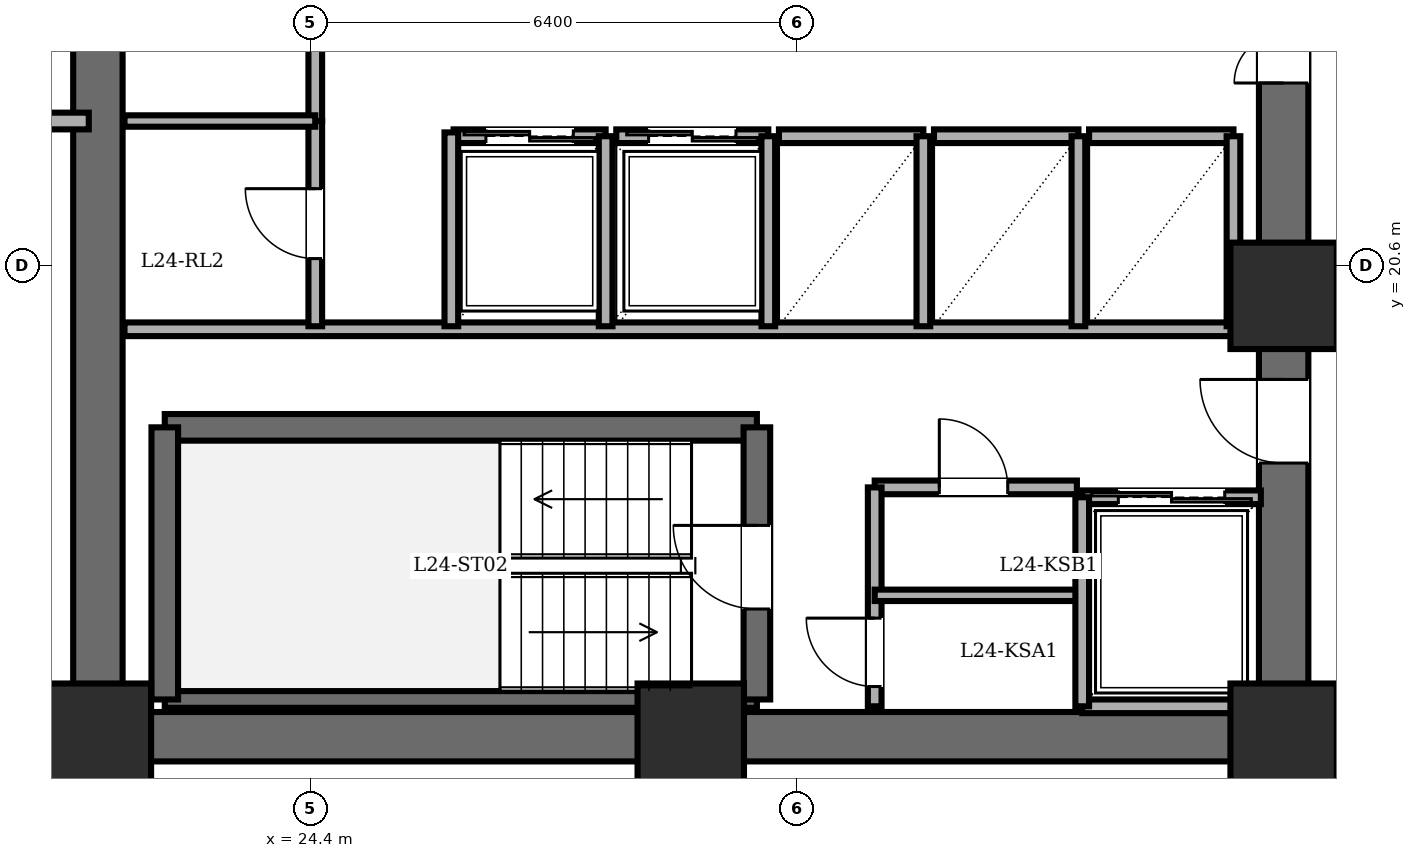
"""IFC4 building model, lengths in metres.
Left out: names, types, materials, properties, quantities, classifications, styles, units other than length and angle.
Written with IfcOpenShell. Run it as: python <this file> out.ifc"""

import sys

from ifc_helpers import new_model, si_unit, direction, frame, frame_2d, origin, origin_2d, place, context, subcontext, project, spatial, rectangle, extrude, element, fill, save


model = new_model("IFC4")
c1 = context("Model", 3, precision=1e-05, world=origin(), true_north=direction((0.0, 1.0)))
c2 = subcontext(c1, "Body", "Model", "MODEL_VIEW")
j1 = project(units=[si_unit("LENGTHUNIT", "METRE"), si_unit("PLANEANGLEUNIT", "RADIAN")], contexts=[c1])
p1 = place(None, origin())
s1 = spatial("IfcSite", under=j1, at=p1, CompositionType="ELEMENT")
p2 = place(p1, origin())
s2 = spatial("IfcBuilding", under=s1, at=p2, CompositionType="ELEMENT")
p3 = place(p2, frame((0.0, 0.0, 93.5)))
s3 = spatial("IfcBuildingStorey", under=s2, at=p3, CompositionType="ELEMENT", Elevation=93.5)
for number, where, z_axis, x_axis in (
    (1, (21.6, 14.4, 0.0), (0.0, 0.0, 1.0), (1.0, 0.0, 0.0)),
    (2, (29.4, 14.4, 0.0), (0.0, 0.0, 1.0), (1.0, 0.0, 0.0)),
    (3, (37.2, 14.4, 0.0), (0.0, 0.0, 1.0), (1.0, 0.0, 0.0)),
    (4, (37.2, 20.2, 0.0), (0.0, 0.0, 1.0), (1.0, 0.0, 0.0)),
):
    element("IfcColumn", number, at=place(p3, frame(where, z_axis=z_axis, x_axis=x_axis)), inside=s3, PredefinedType="COLUMN", context=c2, shape_type="SweptSolid", body=[
        extrude(rectangle(XDim=1.4, YDim=1.4, at=origin_2d()), origin(), (0.0, 0.0, 1.0), 3.6),
    ])
p4 = place(p3, frame((21.6, 14.4, 0.0), z_axis=(0.0, 0.0, 1.0), x_axis=(0.0, 1.0, 0.0)))
e5 = element("IfcWall", 5, at=p4, inside=s3, PredefinedType="SHEAR", context=c2, shape_type="SweptSolid", body=[
    extrude(rectangle(XDim=19.2, YDim=0.65, at=frame_2d((9.6, 0.0))), origin(), (0.0, 0.0, 1.0), 3.4),
])
p5 = place(p3, frame((37.2, 14.4, 0.0), z_axis=(0.0, 0.0, 1.0), x_axis=(-1.0, 0.0, 0.0)))
e6 = element("IfcWall", 6, at=p5, inside=s3, PredefinedType="SHEAR", context=c2, shape_type="SweptSolid", body=[
    extrude(rectangle(XDim=15.6, YDim=0.65, at=frame_2d((7.8, 0.0))), origin(), (0.0, 0.0, 1.0), 3.4),
])
p6 = place(p3, frame((37.2, 14.4, 0.0), z_axis=(0.0, 0.0, 1.0), x_axis=(0.0, 1.0, 0.0)))
e7 = element("IfcWall", 7, at=p6, inside=s3, PredefinedType="SHEAR", context=c2, shape_type="SweptSolid", body=[
    extrude(rectangle(XDim=19.2, YDim=0.65, at=frame_2d((9.6, 0.0))), origin(), (0.0, 0.0, 1.0), 3.4),
])
p7 = place(p6, frame((15.8, 0.0, 0.0)))
e8 = element("IfcOpeningElement", 8, at=p7, cuts=e7, PredefinedType="OPENING", context=c2, shape_type="SweptSolid", body=[
    extrude(rectangle(XDim=1.15, YDim=2.15, at=frame_2d((0.575, 1.075))), frame((0.0, 0.335, 0.0), z_axis=(0.0, -1.0, 0.0), x_axis=(1.0, 0.0, 0.0)), (0.0, 0.0, 1.0), 0.67),
])
p8 = place(p6, frame((3.6, 0.0, 0.0)))
e9 = element("IfcOpeningElement", 9, at=p8, cuts=e7, PredefinedType="OPENING", context=c2, shape_type="SweptSolid", body=[
    extrude(rectangle(XDim=1.1, YDim=2.15, at=frame_2d((0.55, 1.075))), frame((0.0, 0.335, 0.0), z_axis=(0.0, -1.0, 0.0), x_axis=(1.0, 0.0, 0.0)), (0.0, 0.0, 1.0), 0.67),
])
p9 = place(p6, frame((8.6, 0.0, 0.0)))
e10 = element("IfcOpeningElement", 10, at=p9, cuts=e7, PredefinedType="OPENING", context=c2, shape_type="SweptSolid", body=[
    extrude(rectangle(XDim=1.3, YDim=2.2, at=frame_2d((0.65, 1.1))), frame((0.0, 0.335, 0.0), z_axis=(0.0, -1.0, 0.0), x_axis=(1.0, 0.0, 0.0)), (0.0, 0.0, 1.0), 0.67),
])
p10 = place(p3, frame((22.48, 18.47, 0.0), z_axis=(0.0, 0.0, 1.0), x_axis=(1.0, 0.0, 0.0)))
e11 = element("IfcWall", 11, at=p10, inside=s3, PredefinedType="SOLIDWALL", context=c2, shape_type="SweptSolid", body=[
    extrude(rectangle(XDim=7.79, YDim=0.35, at=frame_2d((3.895, 0.0))), origin(), (0.0, 0.0, 1.0), 3.4),
])
p11 = place(p3, frame((22.48, 14.89, 0.0), z_axis=(0.0, 0.0, 1.0), x_axis=(1.0, 0.0, 0.0)))
e12 = element("IfcWall", 12, at=p11, inside=s3, PredefinedType="PARTITIONING", context=c2, shape_type="SweptSolid", body=[
    extrude(rectangle(XDim=7.79, YDim=0.22, at=frame_2d((3.895, 0.0))), origin(), (0.0, 0.0, 1.0), 3.4),
])
p12 = place(p3, frame((22.48, 14.89, 0.0), z_axis=(0.0, 0.0, 1.0), x_axis=(0.0, 1.0, 0.0)))
e13 = element("IfcWall", 13, at=p12, inside=s3, PredefinedType="SOLIDWALL", context=c2, shape_type="SweptSolid", body=[
    extrude(rectangle(XDim=3.58, YDim=0.35, at=frame_2d((1.79, 0.0))), origin(), (0.0, 0.0, 1.0), 3.4),
])
p13 = place(p3, frame((30.27, 14.89, 0.0), z_axis=(0.0, 0.0, 1.0), x_axis=(0.0, 1.0, 0.0)))
e14 = element("IfcWall", 14, at=p13, inside=s3, PredefinedType="SOLIDWALL", context=c2, shape_type="SweptSolid", body=[
    extrude(rectangle(XDim=3.58, YDim=0.35, at=frame_2d((1.79, 0.0))), origin(), (0.0, 0.0, 1.0), 3.4),
])
p14 = place(p13, frame((1.19, 0.0, 0.0)))
e15 = element("IfcOpeningElement", 15, at=p14, cuts=e14, PredefinedType="OPENING", context=c2, shape_type="SweptSolid", body=[
    extrude(rectangle(XDim=1.1, YDim=2.15, at=frame_2d((0.55, 1.075))), frame((0.0, 0.185, 0.0), z_axis=(0.0, -1.0, 0.0), x_axis=(1.0, 0.0, 0.0)), (0.0, 0.0, 1.0), 0.37),
])
p15 = place(p3, frame((21.95, 19.76, 0.0), z_axis=(0.0, 0.0, 1.0), x_axis=(1.0, 0.0, 0.0)))
e16 = element("IfcWall", 16, at=p15, inside=s3, PredefinedType="PARTITIONING", context=c2, shape_type="SweptSolid", body=[
    extrude(rectangle(XDim=14.87, YDim=0.18, at=frame_2d((7.435, 0.0))), origin(), (0.0, 0.0, 1.0), 3.4),
])
p16 = place(p3, frame((31.82, 17.68, 0.0), z_axis=(0.0, 0.0, 1.0), x_axis=(1.0, 0.0, 0.0)))
e17 = element("IfcWall", 17, at=p16, inside=s3, PredefinedType="PARTITIONING", context=c2, shape_type="SweptSolid", body=[
    extrude(rectangle(XDim=2.66, YDim=0.18, at=frame_2d((1.33, 0.0))), origin(), (0.0, 0.0, 1.0), 3.4),
])
p17 = place(p16, frame((0.85, 0.0, 0.0)))
e18 = element("IfcOpeningElement", 18, at=p17, cuts=e17, PredefinedType="OPENING", context=c2, shape_type="SweptSolid", body=[
    extrude(rectangle(XDim=0.9, YDim=2.05, at=frame_2d((0.45, 1.025))), frame((0.0, 0.1, 0.0), z_axis=(0.0, -1.0, 0.0), x_axis=(1.0, 0.0, 0.0)), (0.0, 0.0, 1.0), 0.2),
])
p18 = place(p3, frame((31.82, 14.8, 0.0), z_axis=(0.0, 0.0, 1.0), x_axis=(0.0, 1.0, 0.0)))
e19 = element("IfcWall", 19, at=p18, inside=s3, PredefinedType="PARTITIONING", context=c2, shape_type="SweptSolid", body=[
    extrude(rectangle(XDim=2.88, YDim=0.18, at=frame_2d((1.44, 0.0))), origin(), (0.0, 0.0, 1.0), 3.4),
])
p19 = place(p18, frame((0.26, 0.0, 0.0)))
e20 = element("IfcOpeningElement", 20, at=p19, cuts=e19, PredefinedType="OPENING", context=c2, shape_type="SweptSolid", body=[
    extrude(rectangle(XDim=0.9, YDim=2.05, at=frame_2d((0.45, 1.025))), frame((0.0, 0.1, 0.0), z_axis=(0.0, -1.0, 0.0), x_axis=(1.0, 0.0, 0.0)), (0.0, 0.0, 1.0), 0.2),
])
p20 = place(p3, frame((31.82, 16.26, 0.0), z_axis=(0.0, 0.0, 1.0), x_axis=(1.0, 0.0, 0.0)))
e21 = element("IfcWall", 21, at=p20, inside=s3, PredefinedType="PARTITIONING", context=c2, shape_type="SweptSolid", body=[
    extrude(rectangle(XDim=2.66, YDim=0.15, at=frame_2d((1.33, 0.0))), origin(), (0.0, 0.0, 1.0), 3.4),
])
p21 = place(p3, frame((34.55, 17.55, 0.0), z_axis=(0.0, 0.0, 1.0), x_axis=(1.0, 0.0, 0.0)))
e22 = element("IfcWall", 22, at=p21, inside=s3, PredefinedType="PARTITIONING", context=c2, shape_type="SweptSolid", body=[
    extrude(rectangle(XDim=2.35, YDim=0.18, at=frame_2d((1.175, 0.0))), origin(), (0.0, 0.0, 1.0), 3.4),
])
p22 = place(p21, frame((0.475, 0.0, 0.0)))
e23 = element("IfcOpeningElement", 23, at=p22, cuts=e22, PredefinedType="OPENING", context=c2, shape_type="SweptSolid", body=[
    extrude(rectangle(XDim=1.4, YDim=2.3, at=frame_2d((0.7, 1.15))), frame((0.0, 0.1, 0.0), z_axis=(0.0, -1.0, 0.0), x_axis=(1.0, 0.0, 0.0)), (0.0, 0.0, 1.0), 0.2),
])
p23 = place(p3, frame((36.9, 14.8, 0.0), z_axis=(0.0, 0.0, 1.0), x_axis=(-1.0, 0.0, 0.0)))
e24 = element("IfcWall", 24, at=p23, inside=s3, PredefinedType="PARTITIONING", context=c2, shape_type="SweptSolid", body=[
    extrude(rectangle(XDim=2.35, YDim=0.18, at=frame_2d((1.175, 0.0))), origin(), (0.0, 0.0, 1.0), 3.4),
])
p24 = place(p3, frame((34.55, 17.55, 0.0), z_axis=(0.0, 0.0, 1.0), x_axis=(0.0, -1.0, 0.0)))
e25 = element("IfcWall", 25, at=p24, inside=s3, PredefinedType="PARTITIONING", context=c2, shape_type="SweptSolid", body=[
    extrude(rectangle(XDim=2.75, YDim=0.18, at=frame_2d((1.375, 0.0))), origin(), (0.0, 0.0, 1.0), 3.4),
])
p25 = place(p3, frame((26.28, 22.3, 0.0), z_axis=(0.0, 0.0, 1.0), x_axis=(1.0, 0.0, 0.0)))
e26 = element("IfcWall", 26, at=p25, inside=s3, PredefinedType="PARTITIONING", context=c2, shape_type="SweptSolid", body=[
    extrude(rectangle(XDim=2.0, YDim=0.18, at=frame_2d((1.0, 0.0))), origin(), (0.0, 0.0, 1.0), 3.4),
])
p26 = place(p25, frame((0.425, 0.0, 0.0)))
e27 = element("IfcOpeningElement", 27, at=p26, cuts=e26, PredefinedType="OPENING", context=c2, shape_type="SweptSolid", body=[
    extrude(rectangle(XDim=1.15, YDim=2.2, at=frame_2d((0.575, 1.1))), frame((0.0, 0.1, 0.0), z_axis=(0.0, -1.0, 0.0), x_axis=(1.0, 0.0, 0.0)), (0.0, 0.0, 1.0), 0.2),
])
p27 = place(p3, frame((28.28, 19.8, 0.0), z_axis=(0.0, 0.0, 1.0), x_axis=(0.0, 1.0, 0.0)))
e28 = element("IfcWall", 28, at=p27, inside=s3, PredefinedType="PARTITIONING", context=c2, shape_type="SweptSolid", body=[
    extrude(rectangle(XDim=2.5, YDim=0.18, at=frame_2d((1.25, 0.0))), origin(), (0.0, 0.0, 1.0), 3.4),
])
p28 = place(p3, frame((28.42, 22.3, 0.0), z_axis=(0.0, 0.0, 1.0), x_axis=(1.0, 0.0, 0.0)))
e29 = element("IfcWall", 29, at=p28, inside=s3, PredefinedType="PARTITIONING", context=c2, shape_type="SweptSolid", body=[
    extrude(rectangle(XDim=2.0, YDim=0.18, at=frame_2d((1.0, 0.0))), origin(), (0.0, 0.0, 1.0), 3.4),
])
p29 = place(p28, frame((0.425, 0.0, 0.0)))
e30 = element("IfcOpeningElement", 30, at=p29, cuts=e29, PredefinedType="OPENING", context=c2, shape_type="SweptSolid", body=[
    extrude(rectangle(XDim=1.15, YDim=2.2, at=frame_2d((0.575, 1.1))), frame((0.0, 0.1, 0.0), z_axis=(0.0, -1.0, 0.0), x_axis=(1.0, 0.0, 0.0)), (0.0, 0.0, 1.0), 0.2),
])
p30 = place(p3, frame((30.42, 19.8, 0.0), z_axis=(0.0, 0.0, 1.0), x_axis=(0.0, 1.0, 0.0)))
e31 = element("IfcWall", 31, at=p30, inside=s3, PredefinedType="PARTITIONING", context=c2, shape_type="SweptSolid", body=[
    extrude(rectangle(XDim=2.5, YDim=0.18, at=frame_2d((1.25, 0.0))), origin(), (0.0, 0.0, 1.0), 3.4),
])
p31 = place(p3, frame((30.56, 22.3, 0.0), z_axis=(0.0, 0.0, 1.0), x_axis=(1.0, 0.0, 0.0)))
e32 = element("IfcWall", 32, at=p31, inside=s3, PredefinedType="PARTITIONING", context=c2, shape_type="SweptSolid", body=[
    extrude(rectangle(XDim=1.9, YDim=0.18, at=frame_2d((0.95, 0.0))), origin(), (0.0, 0.0, 1.0), 3.4),
])
p32 = place(p3, frame((32.46, 19.8, 0.0), z_axis=(0.0, 0.0, 1.0), x_axis=(0.0, 1.0, 0.0)))
e33 = element("IfcWall", 33, at=p32, inside=s3, PredefinedType="PARTITIONING", context=c2, shape_type="SweptSolid", body=[
    extrude(rectangle(XDim=2.5, YDim=0.18, at=frame_2d((1.25, 0.0))), origin(), (0.0, 0.0, 1.0), 3.4),
])
p33 = place(p3, frame((32.6, 22.3, 0.0), z_axis=(0.0, 0.0, 1.0), x_axis=(1.0, 0.0, 0.0)))
e34 = element("IfcWall", 34, at=p33, inside=s3, PredefinedType="PARTITIONING", context=c2, shape_type="SweptSolid", body=[
    extrude(rectangle(XDim=1.9, YDim=0.18, at=frame_2d((0.95, 0.0))), origin(), (0.0, 0.0, 1.0), 3.4),
])
p34 = place(p3, frame((34.5, 19.8, 0.0), z_axis=(0.0, 0.0, 1.0), x_axis=(0.0, 1.0, 0.0)))
e35 = element("IfcWall", 35, at=p34, inside=s3, PredefinedType="PARTITIONING", context=c2, shape_type="SweptSolid", body=[
    extrude(rectangle(XDim=2.5, YDim=0.18, at=frame_2d((1.25, 0.0))), origin(), (0.0, 0.0, 1.0), 3.4),
])
p35 = place(p3, frame((34.64, 22.3, 0.0), z_axis=(0.0, 0.0, 1.0), x_axis=(1.0, 0.0, 0.0)))
e36 = element("IfcWall", 36, at=p35, inside=s3, PredefinedType="PARTITIONING", context=c2, shape_type="SweptSolid", body=[
    extrude(rectangle(XDim=1.9, YDim=0.18, at=frame_2d((0.95, 0.0))), origin(), (0.0, 0.0, 1.0), 3.4),
])
p36 = place(p3, frame((36.54, 19.8, 0.0), z_axis=(0.0, 0.0, 1.0), x_axis=(0.0, 1.0, 0.0)))
e37 = element("IfcWall", 37, at=p36, inside=s3, PredefinedType="PARTITIONING", context=c2, shape_type="SweptSolid", body=[
    extrude(rectangle(XDim=2.5, YDim=0.18, at=frame_2d((1.25, 0.0))), origin(), (0.0, 0.0, 1.0), 3.4),
])
p37 = place(p3, frame((24.46, 22.5, 0.0), z_axis=(0.0, 0.0, 1.0), x_axis=(0.0, 1.0, 0.0)))
e38 = element("IfcWall", 38, at=p37, inside=s3, PredefinedType="PARTITIONING", context=c2, shape_type="SweptSolid", body=[
    extrude(rectangle(XDim=5.0, YDim=0.18, at=frame_2d((2.5, 0.0))), origin(), (0.0, 0.0, 1.0), 3.4),
])
p38 = place(p37, frame((2.04, 0.0, 0.0)))
e39 = element("IfcOpeningElement", 39, at=p38, cuts=e38, PredefinedType="OPENING", context=c2, shape_type="SweptSolid", body=[
    extrude(rectangle(XDim=0.92, YDim=2.1, at=frame_2d((0.46, 1.05))), frame((0.0, 0.1, 0.0), z_axis=(0.0, -1.0, 0.0), x_axis=(1.0, 0.0, 0.0)), (0.0, 0.0, 1.0), 0.2),
])
p39 = place(p3, frame((24.46, 19.8, 0.0), z_axis=(0.0, 0.0, 1.0), x_axis=(0.0, 1.0, 0.0)))
e40 = element("IfcWall", 40, at=p39, inside=s3, PredefinedType="PARTITIONING", context=c2, shape_type="SweptSolid", body=[
    extrude(rectangle(XDim=2.7, YDim=0.18, at=frame_2d((1.35, 0.0))), origin(), (0.0, 0.0, 1.0), 3.4),
])
p40 = place(p39, frame((0.89, 0.0, 0.0)))
e41 = element("IfcOpeningElement", 41, at=p40, cuts=e40, PredefinedType="OPENING", context=c2, shape_type="SweptSolid", body=[
    extrude(rectangle(XDim=0.92, YDim=2.1, at=frame_2d((0.46, 1.05))), frame((0.0, 0.1, 0.0), z_axis=(0.0, -1.0, 0.0), x_axis=(1.0, 0.0, 0.0)), (0.0, 0.0, 1.0), 0.2),
])
p41 = place(p3, frame((21.95, 22.5, 0.0), z_axis=(0.0, 0.0, 1.0), x_axis=(1.0, 0.0, 0.0)))
e42 = element("IfcWall", 42, at=p41, inside=s3, PredefinedType="PARTITIONING", context=c2, shape_type="SweptSolid", body=[
    extrude(rectangle(XDim=2.51, YDim=0.15, at=frame_2d((1.255, 0.0))), origin(), (0.0, 0.0, 1.0), 3.4),
])
p42 = place(p3, frame((26.25, 19.8, 0.0), z_axis=(0.0, 0.0, 1.0), x_axis=(0.0, 1.0, 0.0)))
e43 = element("IfcWall", 43, at=p42, inside=s3, PredefinedType="PARTITIONING", context=c2, shape_type="SweptSolid", body=[
    extrude(rectangle(XDim=2.55, YDim=0.18, at=frame_2d((1.275, 0.0))), origin(), (0.0, 0.0, 1.0), 3.4),
])
p43 = place(p3, frame((8.8, 14.18, 0.0), z_axis=(0.0, 0.0, 1.0), x_axis=(1.0, 0.0, 0.0)))
e44 = element("IfcWall", 44, at=p43, inside=s3, PredefinedType="PARTITIONING", context=c2, shape_type="SweptSolid", body=[
    extrude(rectangle(XDim=12.68, YDim=0.22, at=frame_2d((6.34, 0.0))), origin(), (0.0, 0.0, 1.0), 3.4),
])
p44 = place(p43, frame((6.18, 0.0, 0.0)))
e45 = element("IfcOpeningElement", 45, at=p44, cuts=e44, PredefinedType="OPENING", context=c2, shape_type="SweptSolid", body=[
    extrude(rectangle(XDim=1.0, YDim=2.15, at=frame_2d((0.5, 1.075))), frame((0.0, 0.12, 0.0), z_axis=(0.0, -1.0, 0.0), x_axis=(1.0, 0.0, 0.0)), (0.0, 0.0, 1.0), 0.24),
])
p45 = place(p3, frame((8.8, 22.5, 0.0), z_axis=(0.0, 0.0, 1.0), x_axis=(1.0, 0.0, 0.0)))
e46 = element("IfcWall", 46, at=p45, inside=s3, PredefinedType="PARTITIONING", context=c2, shape_type="SweptSolid", body=[
    extrude(rectangle(XDim=12.68, YDim=0.22, at=frame_2d((6.34, 0.0))), origin(), (0.0, 0.0, 1.0), 3.4),
])
p46 = place(p14, origin())
e47 = element("IfcDoor", 47, at=p46, inside=s3, OperationType="SINGLE_SWING_RIGHT", PredefinedType="DOOR", context=c2, shape_type="SweptSolid", body=[
    extrude(rectangle(XDim=1.1, YDim=2.15, at=frame_2d((0.55, 1.075))), frame((0.0, 0.025, 0.0), z_axis=(0.0, -1.0, 0.0), x_axis=(1.0, 0.0, 0.0)), (0.0, 0.0, 1.0), 0.05),
])
fill(e15, e47)
p47 = place(p8, origin())
e48 = element("IfcDoor", 48, at=p47, inside=s3, OperationType="SINGLE_SWING_RIGHT", PredefinedType="DOOR", context=c2, shape_type="SweptSolid", body=[
    extrude(rectangle(XDim=1.1, YDim=2.15, at=frame_2d((0.55, 1.075))), frame((0.0, 0.025, 0.0), z_axis=(0.0, -1.0, 0.0), x_axis=(1.0, 0.0, 0.0)), (0.0, 0.0, 1.0), 0.05),
])
fill(e9, e48)
p48 = place(p17, origin())
e49 = element("IfcDoor", 49, at=p48, inside=s3, OperationType="SINGLE_SWING_LEFT", PredefinedType="DOOR", context=c2, shape_type="SweptSolid", body=[
    extrude(rectangle(XDim=0.9, YDim=2.05, at=frame_2d((0.45, 1.025))), frame((0.0, 0.025, 0.0), z_axis=(0.0, -1.0, 0.0), x_axis=(1.0, 0.0, 0.0)), (0.0, 0.0, 1.0), 0.05),
])
fill(e18, e49)
p49 = place(p19, origin())
e50 = element("IfcDoor", 50, at=p49, inside=s3, OperationType="SINGLE_SWING_RIGHT", PredefinedType="DOOR", context=c2, shape_type="SweptSolid", body=[
    extrude(rectangle(XDim=0.9, YDim=2.05, at=frame_2d((0.45, 1.025))), frame((0.0, 0.025, 0.0), z_axis=(0.0, -1.0, 0.0), x_axis=(1.0, 0.0, 0.0)), (0.0, 0.0, 1.0), 0.05),
])
fill(e20, e50)
p50 = place(p22, origin())
e51 = element("IfcDoor", 51, at=p50, inside=s3, OperationType="DOUBLE_DOOR_SLIDING", PredefinedType="DOOR", context=c2, shape_type="SweptSolid", body=[
    extrude(rectangle(XDim=1.4, YDim=2.3, at=frame_2d((0.7, 1.15))), frame((0.0, 0.025, 0.0), z_axis=(0.0, -1.0, 0.0), x_axis=(1.0, 0.0, 0.0)), (0.0, 0.0, 1.0), 0.05),
])
fill(e23, e51)
p51 = place(p26, origin())
e52 = element("IfcDoor", 52, at=p51, inside=s3, OperationType="DOUBLE_DOOR_SLIDING", PredefinedType="DOOR", context=c2, shape_type="SweptSolid", body=[
    extrude(rectangle(XDim=1.15, YDim=2.2, at=frame_2d((0.575, 1.1))), frame((0.0, 0.025, 0.0), z_axis=(0.0, -1.0, 0.0), x_axis=(1.0, 0.0, 0.0)), (0.0, 0.0, 1.0), 0.05),
])
fill(e27, e52)
p52 = place(p29, origin())
e53 = element("IfcDoor", 53, at=p52, inside=s3, OperationType="DOUBLE_DOOR_SLIDING", PredefinedType="DOOR", context=c2, shape_type="SweptSolid", body=[
    extrude(rectangle(XDim=1.15, YDim=2.2, at=frame_2d((0.575, 1.1))), frame((0.0, 0.025, 0.0), z_axis=(0.0, -1.0, 0.0), x_axis=(1.0, 0.0, 0.0)), (0.0, 0.0, 1.0), 0.05),
])
fill(e30, e53)
p53 = place(p40, origin())
e54 = element("IfcDoor", 54, at=p53, inside=s3, OperationType="SINGLE_SWING_RIGHT", PredefinedType="DOOR", context=c2, shape_type="SweptSolid", body=[
    extrude(rectangle(XDim=0.92, YDim=2.1, at=frame_2d((0.46, 1.05))), frame((0.0, 0.025, 0.0), z_axis=(0.0, -1.0, 0.0), x_axis=(1.0, 0.0, 0.0)), (0.0, 0.0, 1.0), 0.05),
])
fill(e41, e54)
p54 = place(p9, origin())
e55 = element("IfcDoor", 55, at=p54, inside=s3, OperationType="DOUBLE_DOOR_SINGLE_SWING", PredefinedType="DOOR", context=c2, shape_type="SweptSolid", body=[
    extrude(rectangle(XDim=1.3, YDim=2.2, at=frame_2d((0.65, 1.1))), frame((0.0, 0.025, 0.0), z_axis=(0.0, -1.0, 0.0), x_axis=(1.0, 0.0, 0.0)), (0.0, 0.0, 1.0), 0.05),
])
fill(e10, e55)
save(model, sys.argv[1])
